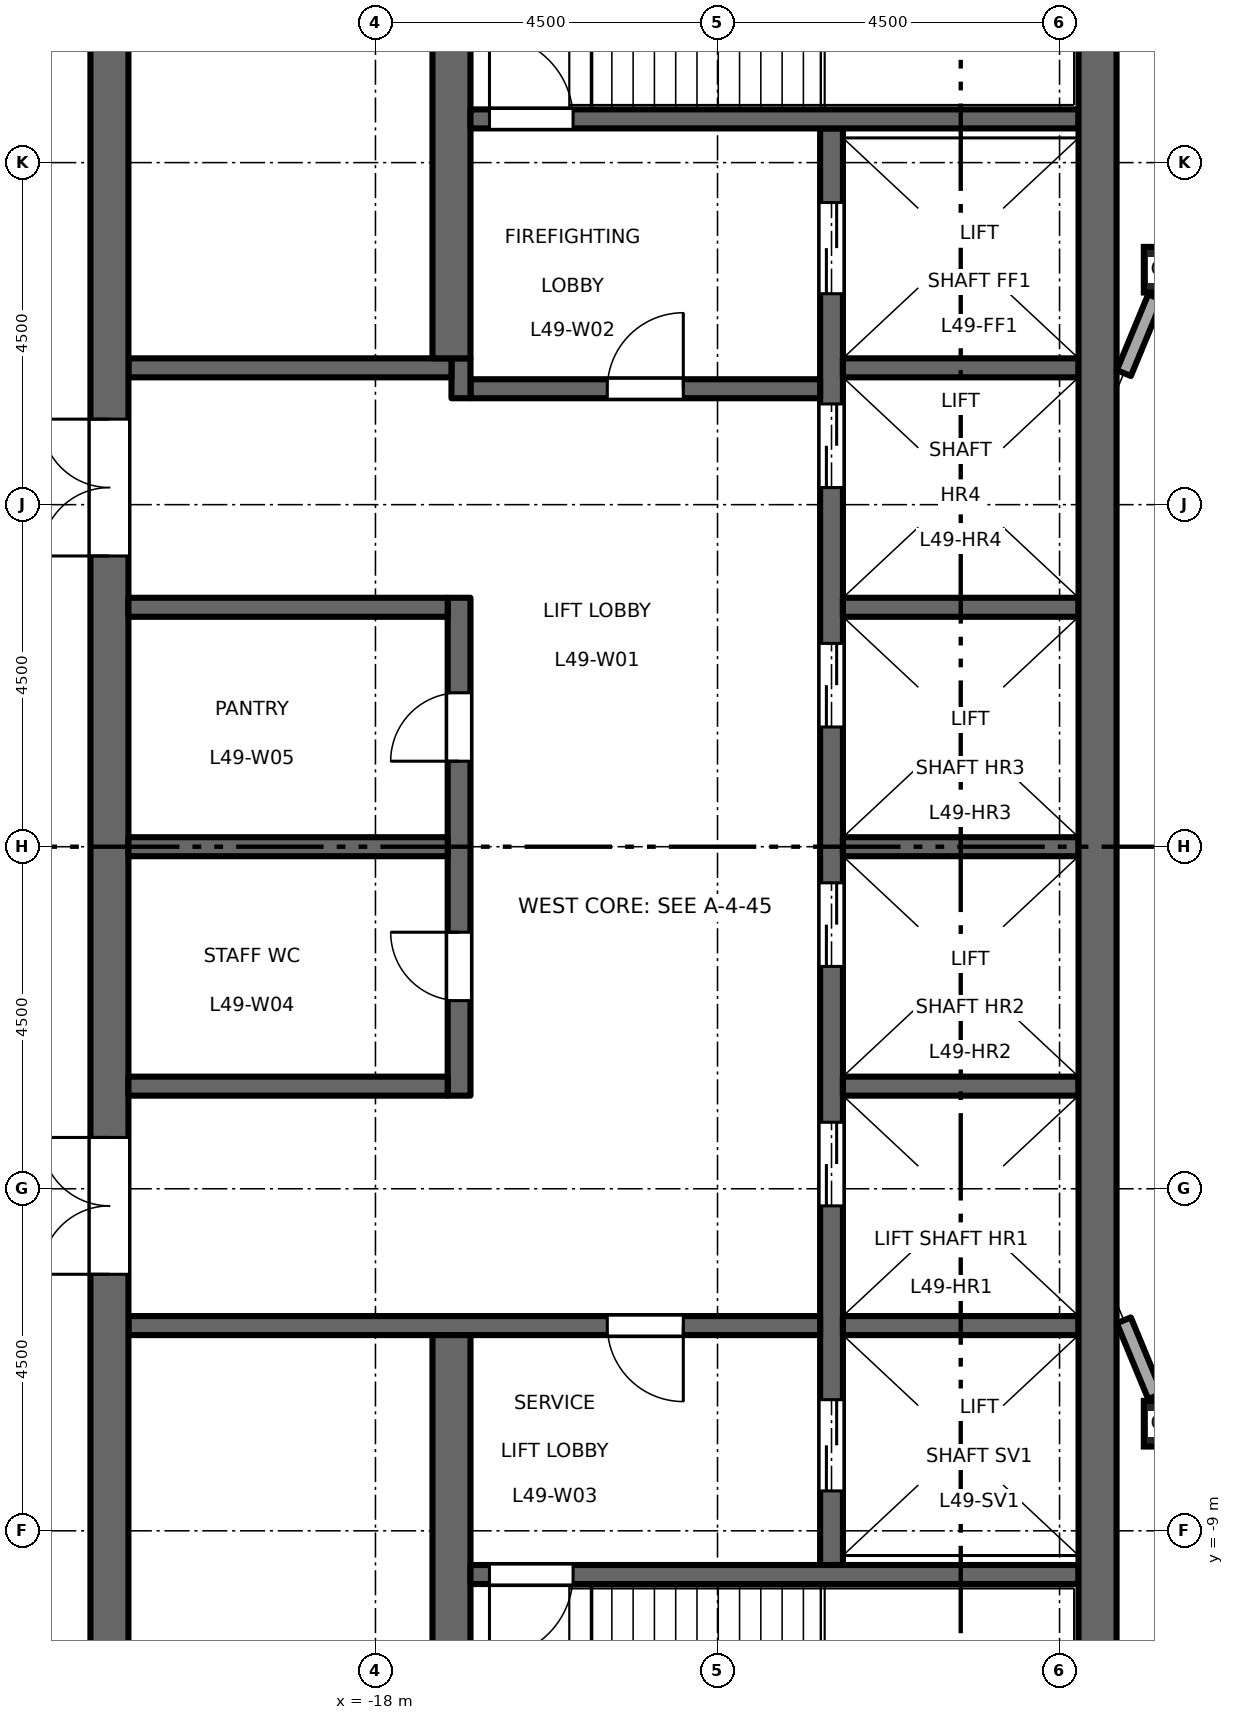
"""IFC4 building model, lengths in metres.
Left out: names, types, materials, properties, quantities, classifications, styles, units other than length and angle.
Written with IfcOpenShell. Run it as: python <this file> out.ifc"""

import sys

from ifc_helpers import new_model, si_unit, direction, frame, frame_2d, origin, origin_2d, place, context, subcontext, project, spatial, rectangle, hollow_rectangle, extrude, element, fill, save


model = new_model("IFC4")
c1 = context("Model", 3, precision=1e-05, world=origin(), true_north=direction((0.0, 1.0)))
c2 = subcontext(c1, "Body", "Model", "MODEL_VIEW")
j1 = project(units=[si_unit("LENGTHUNIT", "METRE"), si_unit("PLANEANGLEUNIT", "RADIAN")], contexts=[c1])
p1 = place(None, origin())
s1 = spatial("IfcSite", under=j1, at=p1, CompositionType="ELEMENT")
p2 = place(p1, origin())
s2 = spatial("IfcBuilding", under=s1, at=p2, CompositionType="ELEMENT")
p3 = place(p2, frame((0.0, 0.0, 228.7)))
s3 = spatial("IfcBuildingStorey", under=s2, at=p3, CompositionType="ELEMENT", Elevation=228.7)
for number, where, z_axis, x_axis in (
    (1, (-7.591, -7.591, 0.0), (0.0, 0.0, 1.0), (1.0, 0.0, 0.0)),
    (2, (-7.591, 7.591, 0.0), (0.0, 0.0, 1.0), (1.0, 0.0, 0.0)),
):
    element("IfcColumn", number, at=place(p3, frame(where, z_axis=z_axis, x_axis=x_axis)), inside=s3, PredefinedType="COLUMN", context=c2, shape_type="SweptSolid", body=[
        extrude(hollow_rectangle(XDim=0.6, YDim=0.6, WallThickness=0.032, at=origin_2d()), origin(), (0.0, 0.0, 1.0), 4.5),
    ])
p4 = place(p3, frame((-12.0, -9.45, 0.0), z_axis=(0.0, 0.0, 1.0), x_axis=(0.0, 1.0, 0.0)))
e3 = element("IfcWall", 3, at=p4, inside=s3, PredefinedType="SHEAR", context=c2, shape_type="SweptSolid", body=[
    extrude(rectangle(XDim=18.9, YDim=0.3, at=frame_2d((9.45, 0.0))), origin(), (0.0, 0.0, 1.0), 4.35),
])
p5 = place(p4, frame((4.725, 0.0, 0.0)))
e4 = element("IfcOpeningElement", 4, at=p5, cuts=e3, PredefinedType="OPENING", context=c2, shape_type="SweptSolid", body=[
    extrude(rectangle(XDim=1.1, YDim=2.1, at=frame_2d((0.55, 1.05))), frame((0.0, 0.16, 0.0), z_axis=(0.0, -1.0, 0.0), x_axis=(1.0, 0.0, 0.0)), (0.0, 0.0, 1.0), 0.32),
])
p6 = place(p4, frame((7.875, 0.0, 0.0)))
e5 = element("IfcOpeningElement", 5, at=p6, cuts=e3, PredefinedType="OPENING", context=c2, shape_type="SweptSolid", body=[
    extrude(rectangle(XDim=1.1, YDim=2.1, at=frame_2d((0.55, 1.05))), frame((0.0, 0.16, 0.0), z_axis=(0.0, -1.0, 0.0), x_axis=(1.0, 0.0, 0.0)), (0.0, 0.0, 1.0), 0.32),
])
p7 = place(p4, frame((11.025, 0.0, 0.0)))
e6 = element("IfcOpeningElement", 6, at=p7, cuts=e3, PredefinedType="OPENING", context=c2, shape_type="SweptSolid", body=[
    extrude(rectangle(XDim=1.1, YDim=2.1, at=frame_2d((0.55, 1.05))), frame((0.0, 0.16, 0.0), z_axis=(0.0, -1.0, 0.0), x_axis=(1.0, 0.0, 0.0)), (0.0, 0.0, 1.0), 0.32),
])
p8 = place(p4, frame((14.175, 0.0, 0.0)))
e7 = element("IfcOpeningElement", 7, at=p8, cuts=e3, PredefinedType="OPENING", context=c2, shape_type="SweptSolid", body=[
    extrude(rectangle(XDim=1.1, YDim=2.1, at=frame_2d((0.55, 1.05))), frame((0.0, 0.16, 0.0), z_axis=(0.0, -1.0, 0.0), x_axis=(1.0, 0.0, 0.0)), (0.0, 0.0, 1.0), 0.32),
])
p9 = place(p4, frame((16.725, 0.0, 0.0)))
e8 = element("IfcOpeningElement", 8, at=p9, cuts=e3, PredefinedType="OPENING", context=c2, shape_type="SweptSolid", body=[
    extrude(rectangle(XDim=1.2, YDim=2.1, at=frame_2d((0.6, 1.05))), frame((0.0, 0.16, 0.0), z_axis=(0.0, -1.0, 0.0), x_axis=(1.0, 0.0, 0.0)), (0.0, 0.0, 1.0), 0.32),
])
p10 = place(p4, frame((0.975, 0.0, 0.0)))
e9 = element("IfcOpeningElement", 9, at=p10, cuts=e3, PredefinedType="OPENING", context=c2, shape_type="SweptSolid", body=[
    extrude(rectangle(XDim=1.2, YDim=2.1, at=frame_2d((0.6, 1.05))), frame((0.0, 0.16, 0.0), z_axis=(0.0, -1.0, 0.0), x_axis=(1.0, 0.0, 0.0)), (0.0, 0.0, 1.0), 0.32),
])
p11 = place(p3, frame((-12.15, 6.025, 0.0), z_axis=(0.0, 0.0, 1.0), x_axis=(-1.0, 0.0, 0.0)))
e10 = element("IfcWall", 10, at=p11, inside=s3, PredefinedType="SHEAR", context=c2, shape_type="SweptSolid", body=[
    extrude(rectangle(XDim=4.6, YDim=0.25, at=frame_2d((2.3, 0.0))), origin(), (0.0, 0.0, 1.0), 4.35),
])
p12 = place(p11, frame((1.8, 0.0, 0.0)))
e11 = element("IfcOpeningElement", 11, at=p12, cuts=e10, PredefinedType="OPENING", context=c2, shape_type="SweptSolid", body=[
    extrude(rectangle(XDim=1.0, YDim=2.1, at=frame_2d((0.5, 1.05))), frame((0.0, 0.135, 0.0), z_axis=(0.0, -1.0, 0.0), x_axis=(1.0, 0.0, 0.0)), (0.0, 0.0, 1.0), 0.27),
])
p13 = place(p3, frame((-16.875, 5.9, 0.0), z_axis=(0.0, 0.0, 1.0), x_axis=(0.0, 1.0, 0.0)))
e12 = element("IfcWall", 12, at=p13, inside=s3, PredefinedType="SHEAR", context=c2, shape_type="SweptSolid", body=[
    extrude(rectangle(XDim=0.525, YDim=0.25, at=frame_2d((0.263, 0.0))), origin(), (0.0, 0.0, 1.0), 4.35),
])
p14 = place(p3, frame((-17.0, 6.3, 0.0), z_axis=(0.0, 0.0, 1.0), x_axis=(-1.0, 0.0, 0.0)))
e13 = element("IfcWall", 13, at=p14, inside=s3, PredefinedType="SHEAR", context=c2, shape_type="SweptSolid", body=[
    extrude(rectangle(XDim=4.25, YDim=0.25, at=frame_2d((2.125, 0.0))), origin(), (0.0, 0.0, 1.0), 4.35),
])
p15 = place(p3, frame((-12.15, -6.3, 0.0), z_axis=(0.0, 0.0, 1.0), x_axis=(-1.0, 0.0, 0.0)))
e14 = element("IfcWall", 14, at=p15, inside=s3, PredefinedType="SHEAR", context=c2, shape_type="SweptSolid", body=[
    extrude(rectangle(XDim=9.1, YDim=0.25, at=frame_2d((4.55, 0.0))), origin(), (0.0, 0.0, 1.0), 4.35),
])
p16 = place(p15, frame((1.8, 0.0, 0.0)))
e15 = element("IfcOpeningElement", 15, at=p16, cuts=e14, PredefinedType="OPENING", context=c2, shape_type="SweptSolid", body=[
    extrude(rectangle(XDim=1.0, YDim=2.1, at=frame_2d((0.5, 1.05))), frame((0.0, 0.135, 0.0), z_axis=(0.0, -1.0, 0.0), x_axis=(1.0, 0.0, 0.0)), (0.0, 0.0, 1.0), 0.27),
])
p17 = place(p3, frame((-21.5, -13.0, 0.0), z_axis=(0.0, 0.0, 1.0), x_axis=(0.0, 1.0, 0.0)))
e16 = element("IfcWall", 16, at=p17, inside=s3, PredefinedType="SHEAR", context=c2, shape_type="SweptSolid", body=[
    extrude(rectangle(XDim=26.0, YDim=0.5, at=frame_2d((13.0, 0.0))), origin(), (0.0, 0.0, 1.0), 4.35),
])
p18 = place(p17, frame((16.825, 0.0, 0.0)))
e17 = element("IfcOpeningElement", 17, at=p18, cuts=e16, PredefinedType="OPENING", context=c2, shape_type="SweptSolid", body=[
    extrude(rectangle(XDim=1.8, YDim=2.1, at=frame_2d((0.9, 1.05))), frame((0.0, 0.26, 0.0), z_axis=(0.0, -1.0, 0.0), x_axis=(1.0, 0.0, 0.0)), (0.0, 0.0, 1.0), 0.52),
])
p19 = place(p17, frame((7.375, 0.0, 0.0)))
e18 = element("IfcOpeningElement", 18, at=p19, cuts=e16, PredefinedType="OPENING", context=c2, shape_type="SweptSolid", body=[
    extrude(rectangle(XDim=1.8, YDim=2.1, at=frame_2d((0.9, 1.05))), frame((0.0, 0.26, 0.0), z_axis=(0.0, -1.0, 0.0), x_axis=(1.0, 0.0, 0.0)), (0.0, 0.0, 1.0), 0.52),
])
p20 = place(p3, frame((-16.9, -3.275, 0.0), z_axis=(0.0, 0.0, 1.0), x_axis=(0.0, 1.0, 0.0)))
e19 = element("IfcWall", 19, at=p20, inside=s3, PredefinedType="SHEAR", context=c2, shape_type="SweptSolid", body=[
    extrude(rectangle(XDim=6.55, YDim=0.3, at=frame_2d((3.275, 0.0))), origin(), (0.0, 0.0, 1.0), 4.35),
])
p21 = place(p20, frame((1.25, 0.0, 0.0)))
e20 = element("IfcOpeningElement", 20, at=p21, cuts=e19, PredefinedType="OPENING", context=c2, shape_type="SweptSolid", body=[
    extrude(rectangle(XDim=0.9, YDim=2.1, at=frame_2d((0.45, 1.05))), frame((0.0, 0.16, 0.0), z_axis=(0.0, -1.0, 0.0), x_axis=(1.0, 0.0, 0.0)), (0.0, 0.0, 1.0), 0.32),
])
p22 = place(p20, frame((4.4, 0.0, 0.0)))
e21 = element("IfcOpeningElement", 21, at=p22, cuts=e19, PredefinedType="OPENING", context=c2, shape_type="SweptSolid", body=[
    extrude(rectangle(XDim=0.9, YDim=2.1, at=frame_2d((0.45, 1.05))), frame((0.0, 0.16, 0.0), z_axis=(0.0, -1.0, 0.0), x_axis=(1.0, 0.0, 0.0)), (0.0, 0.0, 1.0), 0.32),
])
for number, where, z_axis, x_axis in (
    (22, (-17.05, 0.0, 0.0), (0.0, 0.0, 1.0), (-1.0, 0.0, 0.0)),
    (23, (-17.05, 3.15, 0.0), (0.0, 0.0, 1.0), (-1.0, 0.0, 0.0)),
    (24, (-17.05, -3.15, 0.0), (0.0, 0.0, 1.0), (-1.0, 0.0, 0.0)),
):
    element("IfcWall", number, at=place(p3, frame(where, z_axis=z_axis, x_axis=x_axis)), inside=s3, PredefinedType="SHEAR", context=c2, shape_type="SweptSolid", body=[
        extrude(rectangle(XDim=4.2, YDim=0.25, at=frame_2d((2.1, 0.0))), origin(), (0.0, 0.0, 1.0), 4.35),
    ])
for number, where, z_axis, x_axis in (
    (25, (-17.0, 6.425, 0.0), (0.0, 0.0, 1.0), (0.0, 1.0, 0.0)),
    (26, (-17.0, -13.0, 0.0), (0.0, 0.0, 1.0), (0.0, 1.0, 0.0)),
):
    element("IfcWall", number, at=place(p3, frame(where, z_axis=z_axis, x_axis=x_axis)), inside=s3, PredefinedType="SHEAR", context=c2, shape_type="SweptSolid", body=[
        extrude(rectangle(XDim=6.575, YDim=0.5, at=frame_2d((3.288, 0.0))), origin(), (0.0, 0.0, 1.0), 4.35),
    ])
for number, where, z_axis, x_axis in (
    (27, (-8.75, 0.0, 0.0), (0.0, 0.0, 1.0), (-1.0, 0.0, 0.0)),
    (28, (-8.75, 3.15, 0.0), (0.0, 0.0, 1.0), (-1.0, 0.0, 0.0)),
    (29, (-8.75, 6.3, 0.0), (0.0, 0.0, 1.0), (-1.0, 0.0, 0.0)),
    (30, (-8.75, -3.15, 0.0), (0.0, 0.0, 1.0), (-1.0, 0.0, 0.0)),
    (31, (-8.75, -6.3, 0.0), (0.0, 0.0, 1.0), (-1.0, 0.0, 0.0)),
):
    element("IfcWall", number, at=place(p3, frame(where, z_axis=z_axis, x_axis=x_axis)), inside=s3, PredefinedType="SHEAR", context=c2, shape_type="SweptSolid", body=[
        extrude(rectangle(XDim=3.1, YDim=0.25, at=frame_2d((1.55, 0.0))), origin(), (0.0, 0.0, 1.0), 4.35),
    ])
p23 = place(p3, frame((-8.75, 9.575, 0.0), z_axis=(0.0, 0.0, 1.0), x_axis=(-1.0, 0.0, 0.0)))
e32 = element("IfcWall", 32, at=p23, inside=s3, PredefinedType="SHEAR", context=c2, shape_type="SweptSolid", body=[
    extrude(rectangle(XDim=8.0, YDim=0.25, at=frame_2d((4.0, 0.0))), origin(), (0.0, 0.0, 1.0), 4.35),
])
p24 = place(p23, frame((6.65, 0.0, 0.0)))
e33 = element("IfcOpeningElement", 33, at=p24, cuts=e32, PredefinedType="OPENING", context=c2, shape_type="SweptSolid", body=[
    extrude(rectangle(XDim=1.1, YDim=2.1, at=frame_2d((0.55, 1.05))), frame((0.0, 0.135, 0.0), z_axis=(0.0, -1.0, 0.0), x_axis=(1.0, 0.0, 0.0)), (0.0, 0.0, 1.0), 0.27),
])
p25 = place(p3, frame((-8.75, -9.575, 0.0), z_axis=(0.0, 0.0, 1.0), x_axis=(-1.0, 0.0, 0.0)))
e34 = element("IfcWall", 34, at=p25, inside=s3, PredefinedType="SHEAR", context=c2, shape_type="SweptSolid", body=[
    extrude(rectangle(XDim=8.0, YDim=0.25, at=frame_2d((4.0, 0.0))), origin(), (0.0, 0.0, 1.0), 4.35),
])
p26 = place(p25, frame((6.65, 0.0, 0.0)))
e35 = element("IfcOpeningElement", 35, at=p26, cuts=e34, PredefinedType="OPENING", context=c2, shape_type="SweptSolid", body=[
    extrude(rectangle(XDim=1.1, YDim=2.1, at=frame_2d((0.55, 1.05))), frame((0.0, 0.135, 0.0), z_axis=(0.0, -1.0, 0.0), x_axis=(1.0, 0.0, 0.0)), (0.0, 0.0, 1.0), 0.27),
])
p27 = place(p3, frame((-8.5, -13.0, 0.0), z_axis=(0.0, 0.0, 1.0), x_axis=(0.0, 1.0, 0.0)))
e36 = element("IfcWall", 36, at=p27, inside=s3, PredefinedType="SHEAR", context=c2, shape_type="SweptSolid", body=[
    extrude(rectangle(XDim=26.0, YDim=0.5, at=frame_2d((13.0, 0.0))), origin(), (0.0, 0.0, 1.0), 4.35),
])
for number, where, z_axis, x_axis in (
    (37, (-7.741, 7.229, 0.0), (0.0, 0.0, 1.0), (-0.383, -0.924, 0.0)),
    (38, (-8.154, -6.231, 0.0), (0.0, 0.0, 1.0), (0.383, -0.924, 0.0)),
):
    element("IfcWall", number, at=place(p3, frame(where, z_axis=z_axis, x_axis=x_axis)), inside=s3, PredefinedType="STANDARD", context=c2, shape_type="SweptSolid", body=[
        extrude(rectangle(XDim=1.08, YDim=0.2, at=frame_2d((0.54, 0.0))), origin(), (0.0, 0.0, 1.0), 3.918),
    ])
p28 = place(p12, origin())
e39 = element("IfcDoor", 39, at=p28, inside=s3, OperationType="SINGLE_SWING_LEFT", PredefinedType="DOOR", context=c2, shape_type="SweptSolid", body=[
    extrude(rectangle(XDim=1.0, YDim=2.1, at=frame_2d((0.5, 1.05))), frame((0.0, 0.025, 0.0), z_axis=(0.0, -1.0, 0.0), x_axis=(1.0, 0.0, 0.0)), (0.0, 0.0, 1.0), 0.05),
])
fill(e11, e39)
p29 = place(p16, origin())
e40 = element("IfcDoor", 40, at=p29, inside=s3, OperationType="SINGLE_SWING_RIGHT", PredefinedType="DOOR", context=c2, shape_type="SweptSolid", body=[
    extrude(rectangle(XDim=1.0, YDim=2.1, at=frame_2d((0.5, 1.05))), frame((0.0, 0.025, 0.0), z_axis=(0.0, -1.0, 0.0), x_axis=(1.0, 0.0, 0.0)), (0.0, 0.0, 1.0), 0.05),
])
fill(e15, e40)
p30 = place(p24, origin())
e41 = element("IfcDoor", 41, at=p30, inside=s3, OperationType="SINGLE_SWING_RIGHT", PredefinedType="DOOR", context=c2, shape_type="SweptSolid", body=[
    extrude(rectangle(XDim=1.1, YDim=2.1, at=frame_2d((0.55, 1.05))), frame((0.0, 0.025, 0.0), z_axis=(0.0, -1.0, 0.0), x_axis=(1.0, 0.0, 0.0)), (0.0, 0.0, 1.0), 0.05),
])
fill(e33, e41)
p31 = place(p26, origin())
e42 = element("IfcDoor", 42, at=p31, inside=s3, OperationType="SINGLE_SWING_LEFT", PredefinedType="DOOR", context=c2, shape_type="SweptSolid", body=[
    extrude(rectangle(XDim=1.1, YDim=2.1, at=frame_2d((0.55, 1.05))), frame((0.0, 0.025, 0.0), z_axis=(0.0, -1.0, 0.0), x_axis=(1.0, 0.0, 0.0)), (0.0, 0.0, 1.0), 0.05),
])
fill(e35, e42)
p32 = place(p18, origin())
e43 = element("IfcDoor", 43, at=p32, inside=s3, OperationType="DOUBLE_DOOR_DOUBLE_SWING", PredefinedType="DOOR", context=c2, shape_type="SweptSolid", body=[
    extrude(rectangle(XDim=1.8, YDim=2.1, at=frame_2d((0.9, 1.05))), frame((0.0, 0.025, 0.0), z_axis=(0.0, -1.0, 0.0), x_axis=(1.0, 0.0, 0.0)), (0.0, 0.0, 1.0), 0.05),
])
fill(e17, e43)
p33 = place(p19, origin())
e44 = element("IfcDoor", 44, at=p33, inside=s3, OperationType="DOUBLE_DOOR_DOUBLE_SWING", PredefinedType="DOOR", context=c2, shape_type="SweptSolid", body=[
    extrude(rectangle(XDim=1.8, YDim=2.1, at=frame_2d((0.9, 1.05))), frame((0.0, 0.025, 0.0), z_axis=(0.0, -1.0, 0.0), x_axis=(1.0, 0.0, 0.0)), (0.0, 0.0, 1.0), 0.05),
])
fill(e18, e44)
p34 = place(p5, origin())
e45 = element("IfcDoor", 45, at=p34, inside=s3, OperationType="DOUBLE_DOOR_SLIDING", PredefinedType="DOOR", context=c2, shape_type="SweptSolid", body=[
    extrude(rectangle(XDim=1.1, YDim=2.1, at=frame_2d((0.55, 1.05))), frame((0.0, 0.025, 0.0), z_axis=(0.0, -1.0, 0.0), x_axis=(1.0, 0.0, 0.0)), (0.0, 0.0, 1.0), 0.05),
])
fill(e4, e45)
p35 = place(p6, origin())
e46 = element("IfcDoor", 46, at=p35, inside=s3, OperationType="DOUBLE_DOOR_SLIDING", PredefinedType="DOOR", context=c2, shape_type="SweptSolid", body=[
    extrude(rectangle(XDim=1.1, YDim=2.1, at=frame_2d((0.55, 1.05))), frame((0.0, 0.025, 0.0), z_axis=(0.0, -1.0, 0.0), x_axis=(1.0, 0.0, 0.0)), (0.0, 0.0, 1.0), 0.05),
])
fill(e5, e46)
p36 = place(p7, origin())
e47 = element("IfcDoor", 47, at=p36, inside=s3, OperationType="DOUBLE_DOOR_SLIDING", PredefinedType="DOOR", context=c2, shape_type="SweptSolid", body=[
    extrude(rectangle(XDim=1.1, YDim=2.1, at=frame_2d((0.55, 1.05))), frame((0.0, 0.025, 0.0), z_axis=(0.0, -1.0, 0.0), x_axis=(1.0, 0.0, 0.0)), (0.0, 0.0, 1.0), 0.05),
])
fill(e6, e47)
p37 = place(p8, origin())
e48 = element("IfcDoor", 48, at=p37, inside=s3, OperationType="DOUBLE_DOOR_SLIDING", PredefinedType="DOOR", context=c2, shape_type="SweptSolid", body=[
    extrude(rectangle(XDim=1.1, YDim=2.1, at=frame_2d((0.55, 1.05))), frame((0.0, 0.025, 0.0), z_axis=(0.0, -1.0, 0.0), x_axis=(1.0, 0.0, 0.0)), (0.0, 0.0, 1.0), 0.05),
])
fill(e7, e48)
p38 = place(p9, origin())
e49 = element("IfcDoor", 49, at=p38, inside=s3, OperationType="DOUBLE_DOOR_SLIDING", PredefinedType="DOOR", context=c2, shape_type="SweptSolid", body=[
    extrude(rectangle(XDim=1.2, YDim=2.1, at=frame_2d((0.6, 1.05))), frame((0.0, 0.025, 0.0), z_axis=(0.0, -1.0, 0.0), x_axis=(1.0, 0.0, 0.0)), (0.0, 0.0, 1.0), 0.05),
])
fill(e8, e49)
p39 = place(p10, origin())
e50 = element("IfcDoor", 50, at=p39, inside=s3, OperationType="DOUBLE_DOOR_SLIDING", PredefinedType="DOOR", context=c2, shape_type="SweptSolid", body=[
    extrude(rectangle(XDim=1.2, YDim=2.1, at=frame_2d((0.6, 1.05))), frame((0.0, 0.025, 0.0), z_axis=(0.0, -1.0, 0.0), x_axis=(1.0, 0.0, 0.0)), (0.0, 0.0, 1.0), 0.05),
])
fill(e9, e50)
p40 = place(p21, origin())
e51 = element("IfcDoor", 51, at=p40, inside=s3, OperationType="SINGLE_SWING_LEFT", PredefinedType="DOOR", context=c2, shape_type="SweptSolid", body=[
    extrude(rectangle(XDim=0.9, YDim=2.1, at=frame_2d((0.45, 1.05))), frame((0.0, 0.025, 0.0), z_axis=(0.0, -1.0, 0.0), x_axis=(1.0, 0.0, 0.0)), (0.0, 0.0, 1.0), 0.05),
])
fill(e20, e51)
p41 = place(p22, origin())
e52 = element("IfcDoor", 52, at=p41, inside=s3, OperationType="SINGLE_SWING_RIGHT", PredefinedType="DOOR", context=c2, shape_type="SweptSolid", body=[
    extrude(rectangle(XDim=0.9, YDim=2.1, at=frame_2d((0.45, 1.05))), frame((0.0, 0.025, 0.0), z_axis=(0.0, -1.0, 0.0), x_axis=(1.0, 0.0, 0.0)), (0.0, 0.0, 1.0), 0.05),
])
fill(e21, e52)
save(model, sys.argv[1])
